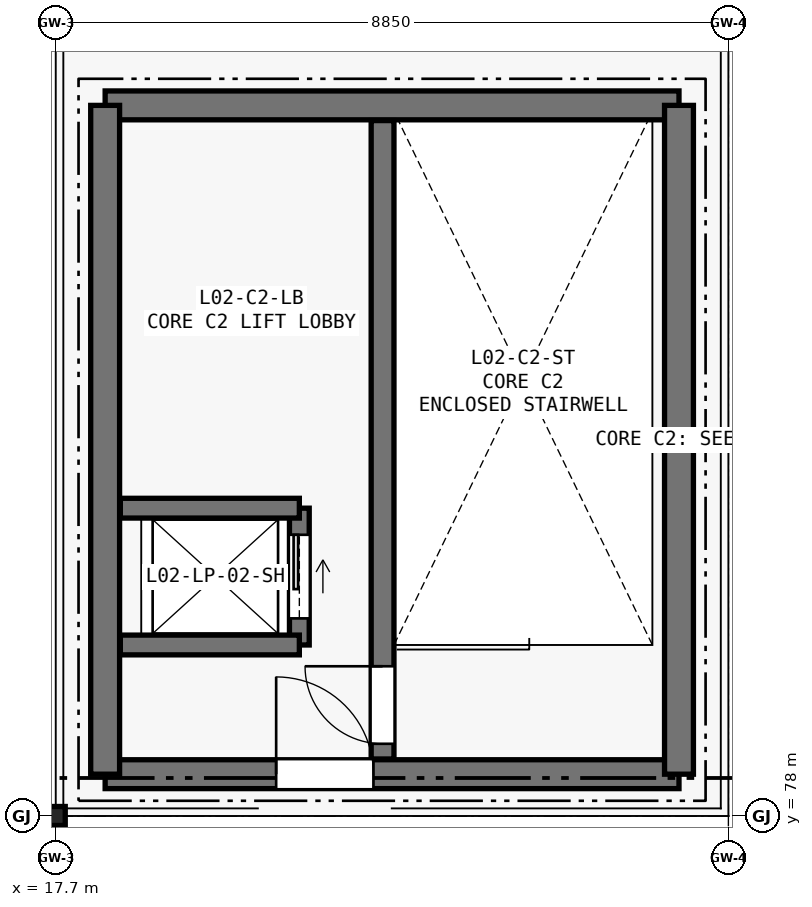
"""IFC4 building model, lengths in metres.
Left out: names, types, materials, properties, quantities, classifications, styles, units other than length and angle.
Written with IfcOpenShell. Run it as: python <this file> out.ifc"""

import sys

from ifc_helpers import new_model, si_unit, direction, frame, frame_2d, origin, origin_2d, place, context, subcontext, project, spatial, rectangle, i_section, extrude, element, fill, save


model = new_model("IFC4")
c1 = context("Model", 3, precision=1e-05, world=origin(), true_north=direction((0.0, 1.0)))
c2 = subcontext(c1, "Body", "Model", "MODEL_VIEW")
j1 = project(units=[si_unit("LENGTHUNIT", "METRE"), si_unit("PLANEANGLEUNIT", "RADIAN")], contexts=[c1])
p1 = place(None, origin())
s1 = spatial("IfcSite", under=j1, at=p1, CompositionType="ELEMENT")
p2 = place(p1, origin())
s2 = spatial("IfcBuilding", under=s1, at=p2, CompositionType="ELEMENT")
p3 = place(p2, frame((0.0, 0.0, 10.8)))
s3 = spatial("IfcBuildingStorey", under=s2, at=p3, CompositionType="ELEMENT", Elevation=10.8)
p4 = place(p3, frame((17.7, 78.0, 0.0), z_axis=(0.0, 0.0, 1.0), x_axis=(1.0, 0.0, 0.0)))
e1 = element("IfcColumn", 1, at=p4, inside=s3, PredefinedType="COLUMN", context=c2, shape_type="SweptSolid", body=[
    extrude(i_section(OverallWidth=0.25, OverallDepth=0.25, WebThickness=0.009, FlangeThickness=0.014, FilletRadius=0.016, at=origin_2d()), origin(), (0.0, 0.0, 1.0), 4.2),
])
p5 = place(p3, frame((18.35, 78.55, 0.0), z_axis=(0.0, 0.0, 1.0), x_axis=(1.0, 0.0, 0.0)))
e2 = element("IfcWall", 2, at=p5, inside=s3, PredefinedType="SHEAR", context=c2, shape_type="SweptSolid", body=[
    extrude(rectangle(XDim=7.55, YDim=0.38, at=frame_2d((3.775, 0.0))), origin(), (0.0, 0.0, 1.0), 4.2),
])
p6 = place(p5, frame((2.25, 0.0, 0.0)))
e3 = element("IfcOpeningElement", 3, at=p6, cuts=e2, PredefinedType="OPENING", context=c2, shape_type="SweptSolid", body=[
    extrude(rectangle(XDim=1.28, YDim=2.15, at=frame_2d((0.64, 1.075))), frame((0.0, 0.2, 0.0), z_axis=(0.0, -1.0, 0.0), x_axis=(1.0, 0.0, 0.0)), (0.0, 0.0, 1.0), 0.4),
])
p7 = place(p3, frame((25.9, 87.35, 0.0), z_axis=(0.0, 0.0, 1.0), x_axis=(-1.0, 0.0, 0.0)))
e4 = element("IfcWall", 4, at=p7, inside=s3, PredefinedType="SHEAR", context=c2, shape_type="SweptSolid", body=[
    extrude(rectangle(XDim=7.55, YDim=0.38, at=frame_2d((3.775, 0.0))), origin(), (0.0, 0.0, 1.0), 4.2),
])
for number, where, z_axis, x_axis in (
    (5, (18.35, 87.35, 0.0), (0.0, 0.0, 1.0), (0.0, -1.0, 0.0)),
    (6, (25.9, 78.55, 0.0), (0.0, 0.0, 1.0), (0.0, 1.0, 0.0)),
):
    element("IfcWall", number, at=place(p3, frame(where, z_axis=z_axis, x_axis=x_axis)), inside=s3, PredefinedType="SHEAR", context=c2, shape_type="SweptSolid", body=[
        extrude(rectangle(XDim=8.8, YDim=0.38, at=frame_2d((4.4, 0.0))), origin(), (0.0, 0.0, 1.0), 4.2),
    ])
p8 = place(p3, frame((22.0, 78.75, 0.0), z_axis=(0.0, 0.0, 1.0), x_axis=(0.0, 1.0, 0.0)))
e7 = element("IfcWall", 7, at=p8, inside=s3, PredefinedType="SHEAR", context=c2, shape_type="SweptSolid", body=[
    extrude(rectangle(XDim=8.4, YDim=0.3, at=frame_2d((4.2, 0.0))), origin(), (0.0, 0.0, 1.0), 4.2),
])
p9 = place(p8, frame((0.2, 0.0, 0.0)))
e8 = element("IfcOpeningElement", 8, at=p9, cuts=e7, PredefinedType="OPENING", context=c2, shape_type="SweptSolid", body=[
    extrude(rectangle(XDim=1.02, YDim=2.1, at=frame_2d((0.51, 1.05))), frame((0.0, 0.16, 0.0), z_axis=(0.0, -1.0, 0.0), x_axis=(1.0, 0.0, 0.0)), (0.0, 0.0, 1.0), 0.32),
])
p10 = place(p3, frame((20.905, 80.25, 0.0), z_axis=(0.0, 0.0, 1.0), x_axis=(0.0, 1.0, 0.0)))
e9 = element("IfcWall", 9, at=p10, inside=s3, PredefinedType="SHEAR", context=c2, shape_type="SweptSolid", body=[
    extrude(rectangle(XDim=1.8, YDim=0.26, at=frame_2d((0.9, 0.0))), origin(), (0.0, 0.0, 1.0), 4.2),
])
p11 = place(p10, frame((0.35, 0.0, 0.0)))
e10 = element("IfcOpeningElement", 10, at=p11, cuts=e9, PredefinedType="OPENING", context=c2, shape_type="SweptSolid", body=[
    extrude(rectangle(XDim=1.1, YDim=2.15, at=frame_2d((0.55, 1.075))), frame((0.0, 0.14, 0.0), z_axis=(0.0, -1.0, 0.0), x_axis=(1.0, 0.0, 0.0)), (0.0, 0.0, 1.0), 0.28),
])
for number, where, z_axis, x_axis in (
    (11, (18.55, 80.25, 0.0), (0.0, 0.0, 1.0), (1.0, 0.0, 0.0)),
    (12, (18.55, 82.05, 0.0), (0.0, 0.0, 1.0), (1.0, 0.0, 0.0)),
):
    element("IfcWall", number, at=place(p3, frame(where, z_axis=z_axis, x_axis=x_axis)), inside=s3, PredefinedType="SHEAR", context=c2, shape_type="SweptSolid", body=[
        extrude(rectangle(XDim=2.355, YDim=0.26, at=frame_2d((1.177, 0.0))), origin(), (0.0, 0.0, 1.0), 4.2),
    ])
p12 = place(p6, origin())
e13 = element("IfcDoor", 13, at=p12, inside=s3, OperationType="SINGLE_SWING_LEFT", PredefinedType="DOOR", context=c2, shape_type="SweptSolid", body=[
    extrude(rectangle(XDim=1.28, YDim=2.15, at=frame_2d((0.64, 1.075))), frame((0.0, 0.025, 0.0), z_axis=(0.0, -1.0, 0.0), x_axis=(1.0, 0.0, 0.0)), (0.0, 0.0, 1.0), 0.05),
])
fill(e3, e13)
p13 = place(p9, origin())
e14 = element("IfcDoor", 14, at=p13, inside=s3, OperationType="SINGLE_SWING_RIGHT", PredefinedType="DOOR", context=c2, shape_type="SweptSolid", body=[
    extrude(rectangle(XDim=1.02, YDim=2.1, at=frame_2d((0.51, 1.05))), frame((0.0, 0.025, 0.0), z_axis=(0.0, -1.0, 0.0), x_axis=(1.0, 0.0, 0.0)), (0.0, 0.0, 1.0), 0.05),
])
fill(e8, e14)
p14 = place(p11, origin())
e15 = element("IfcDoor", 15, at=p14, inside=s3, OperationType="SLIDING_TO_RIGHT", PredefinedType="DOOR", context=c2, shape_type="SweptSolid", body=[
    extrude(rectangle(XDim=1.1, YDim=2.15, at=frame_2d((0.55, 1.075))), frame((0.0, 0.025, 0.0), z_axis=(0.0, -1.0, 0.0), x_axis=(1.0, 0.0, 0.0)), (0.0, 0.0, 1.0), 0.05),
])
fill(e10, e15)
save(model, sys.argv[1])
